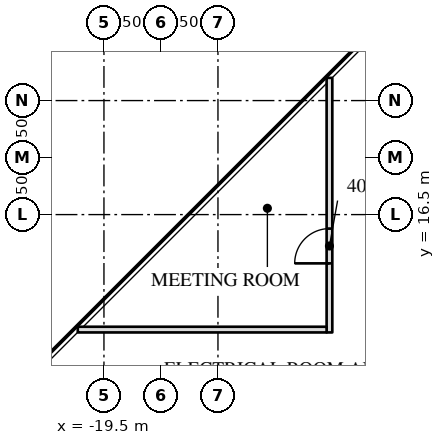
"""IFC4 building model, lengths in metres.
Left out: names, types, materials, properties, quantities, classifications, styles, units other than length and angle.
Written with IfcOpenShell. Run it as: python <this file> out.ifc"""

import sys

from ifc_helpers import new_model, si_unit, direction, frame, frame_2d, origin, place, context, subcontext, project, spatial, rectangle, extrude, element, fill, save


model = new_model("IFC4")
c1 = context("Model", 3, precision=1e-05, world=origin(), true_north=direction((0.0, 1.0)))
c2 = subcontext(c1, "Body", "Model", "MODEL_VIEW")
j1 = project(units=[si_unit("LENGTHUNIT", "METRE"), si_unit("PLANEANGLEUNIT", "RADIAN")], contexts=[c1])
p1 = place(None, origin())
s1 = spatial("IfcSite", under=j1, at=p1, CompositionType="ELEMENT")
p2 = place(p1, origin())
s2 = spatial("IfcBuilding", under=s1, at=p2, CompositionType="ELEMENT")
p3 = place(p2, frame((0.0, 0.0, 170.5)))
s3 = spatial("IfcBuildingStorey", under=s2, at=p3, CompositionType="ELEMENT", Elevation=170.5)
p4 = place(p3, frame((-13.566, 13.399, 0.0), z_axis=(0.0, 0.0, 1.0), x_axis=(0.0, 1.0, 0.0)))
e1 = element("IfcWall", 1, at=p4, inside=s3, PredefinedType="PARTITIONING", context=c2, shape_type="SweptSolid", body=[
    extrude(rectangle(XDim=6.698, YDim=0.15, at=frame_2d((3.349, 0.0))), origin(), (0.0, 0.0, 1.0), 3.91),
])
p5 = place(p4, frame((1.817, 0.0, 0.0)))
e2 = element("IfcOpeningElement", 2, at=p5, cuts=e1, PredefinedType="OPENING", context=c2, shape_type="SweptSolid", body=[
    extrude(rectangle(XDim=0.915, YDim=2.134, at=frame_2d((0.458, 1.067))), frame((0.0, 0.085, 0.0), z_axis=(0.0, -1.0, 0.0), x_axis=(1.0, 0.0, 0.0)), (0.0, 0.0, 1.0), 0.17),
])
p6 = place(p3, frame((-13.641, 13.474, 0.0), z_axis=(0.0, 0.0, 1.0), x_axis=(-1.0, 0.0, 0.0)))
e3 = element("IfcWall", 3, at=p6, inside=s3, PredefinedType="PARTITIONING", context=c2, shape_type="SweptSolid", body=[
    extrude(rectangle(XDim=6.548, YDim=0.15, at=frame_2d((3.274, 0.0))), origin(), (0.0, 0.0, 1.0), 3.91),
])
p7 = place(p5, origin())
e4 = element("IfcDoor", 4, at=p7, inside=s3, OperationType="SINGLE_SWING_LEFT", PredefinedType="DOOR", context=c2, shape_type="SweptSolid", body=[
    extrude(rectangle(XDim=0.915, YDim=2.134, at=frame_2d((0.458, 1.067))), frame((0.0, 0.025, 0.0), z_axis=(0.0, -1.0, 0.0), x_axis=(1.0, 0.0, 0.0)), (0.0, 0.0, 1.0), 0.05),
])
fill(e2, e4)
save(model, sys.argv[1])
